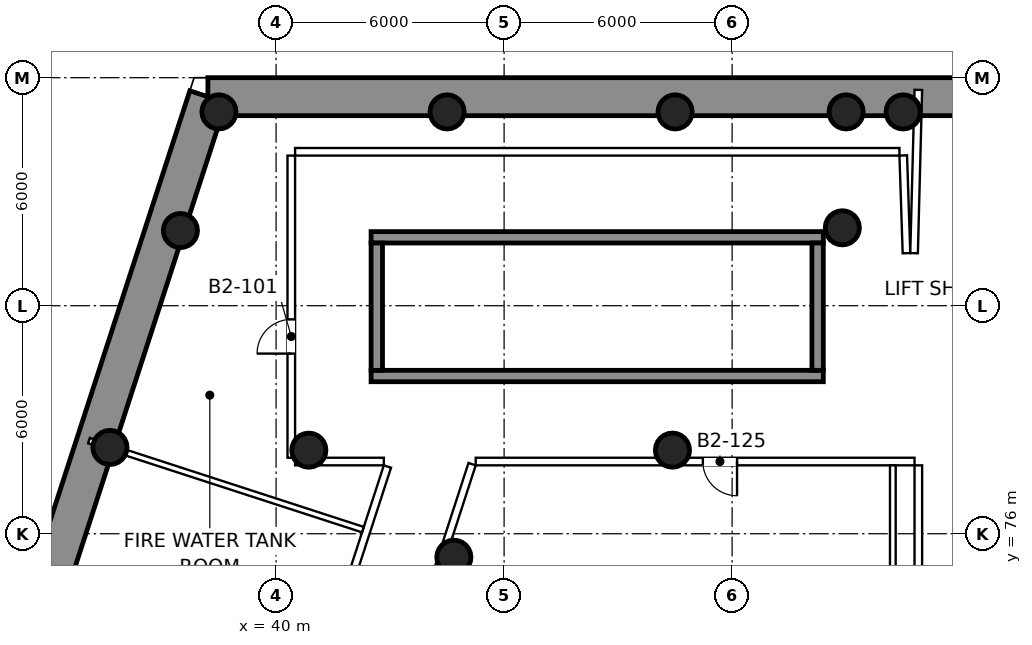
"""IFC4 building model, lengths in metres.
Left out: names, types, materials, properties, quantities, classifications, styles, units other than length and angle.
Written with IfcOpenShell. Run it as: python <this file> out.ifc"""

import sys

from ifc_helpers import new_model, si_unit, direction, frame, frame_2d, origin, origin_2d, place, context, subcontext, project, spatial, rectangle, circle, extrude, element, fill, save


model = new_model("IFC4")
c1 = context("Model", 3, precision=1e-05, world=origin(), true_north=direction((0.0, 1.0)))
c2 = subcontext(c1, "Body", "Model", "MODEL_VIEW")
j1 = project(units=[si_unit("LENGTHUNIT", "METRE"), si_unit("PLANEANGLEUNIT", "RADIAN")], contexts=[c1])
p1 = place(None, origin())
s1 = spatial("IfcSite", under=j1, at=p1, CompositionType="ELEMENT")
p2 = place(p1, origin())
s2 = spatial("IfcBuilding", under=s1, at=p2, CompositionType="ELEMENT")
p3 = place(p2, frame((0.0, 0.0, -10.0)))
s3 = spatial("IfcBuildingStorey", under=s2, at=p3, CompositionType="ELEMENT", Elevation=-10.0)
p4 = place(p3, frame((29.446, 60.539, 0.0), z_axis=(0.0, 0.0, 1.0), x_axis=(0.309015382076, 0.951057040161, 0.0)))
e1 = element("IfcWall", 1, at=p4, inside=s3, PredefinedType="SOLIDWALL", context=c2, shape_type="SweptSolid", body=[
    extrude(rectangle(XDim=28.348, YDim=1.0, at=frame_2d((14.174, 0.0))), origin(), (0.0, 0.0, 1.0), 4.65),
])
p5 = place(p3, frame((38.206, 87.5, 0.0), z_axis=(0.0, 0.0, 1.0), x_axis=(1.0, 0.0, 0.0)))
e2 = element("IfcWall", 2, at=p5, inside=s3, PredefinedType="SOLIDWALL", context=c2, shape_type="SweptSolid", body=[
    extrude(rectangle(XDim=20.794, YDim=1.0, at=frame_2d((10.397, 0.0))), origin(), (0.0, 0.0, 1.0), 4.65),
])
for number, where, z_axis, x_axis in (
    (3, (54.9, 84.05, 0.0), (0.0, 0.0, 1.0), (1.0, 0.0, 0.0)),
    (4, (50.43, 78.2, 0.0), (0.0, 0.0, 1.0), (1.0, 0.0, 0.0)),
    (5, (56.5, 87.1, 0.0), (0.0, 0.0, 1.0), (1.0, 0.0, 0.0)),
    (6, (50.5, 87.1, 0.0), (0.0, 0.0, 1.0), (1.0, 0.0, 0.0)),
    (7, (44.5, 87.1, 0.0), (0.0, 0.0, 1.0), (1.0, 0.0, 0.0)),
    (8, (38.496, 87.1, 0.0), (0.0, 0.0, 1.0), (1.0, 0.0, 0.0)),
    (9, (37.482, 83.978, 0.0), (0.0, 0.0, 1.0), (1.0, 0.0, 0.0)),
    (10, (35.628, 78.271, 0.0), (0.0, 0.0, 1.0), (1.0, 0.0, 0.0)),
    (11, (40.862, 78.199, 0.0), (0.0, 0.0, 1.0), (1.0, 0.0, 0.0)),
    (12, (55.0, 87.1, 0.0), (0.0, 0.0, 1.0), (1.0, 0.0, 0.0)),
    (13, (44.678, 75.382, 0.0), (0.0, 0.0, 1.0), (1.0, 0.0, 0.0)),
):
    element("IfcColumn", number, at=place(p3, frame(where, z_axis=z_axis, x_axis=x_axis)), inside=s3, PredefinedType="COLUMN", context=c2, shape_type="SweptSolid", body=[
        extrude(circle(Radius=0.45, at=origin_2d()), origin(), (0.0, 0.0, 1.0), 5.0),
    ])
for number, where, z_axis, x_axis in (
    (14, (42.5, 80.15, 0.0), (0.0, 0.0, 1.0), (1.0, 0.0, 0.0)),
    (15, (42.5, 83.8, 0.0), (0.0, 0.0, 1.0), (1.0, 0.0, 0.0)),
):
    element("IfcWall", number, at=place(p3, frame(where, z_axis=z_axis, x_axis=x_axis)), inside=s3, PredefinedType="SHEAR", context=c2, shape_type="SweptSolid", body=[
        extrude(rectangle(XDim=11.9, YDim=0.3, at=frame_2d((5.95, 0.0))), origin(), (0.0, 0.0, 1.0), 5.0),
    ])
for number, where, z_axis, x_axis in (
    (16, (42.65, 80.3, 0.0), (0.0, 0.0, 1.0), (0.0, 1.0, 0.0)),
    (17, (54.25, 80.3, 0.0), (0.0, 0.0, 1.0), (0.0, 1.0, 0.0)),
):
    element("IfcWall", number, at=place(p3, frame(where, z_axis=z_axis, x_axis=x_axis)), inside=s3, PredefinedType="SHEAR", context=c2, shape_type="SweptSolid", body=[
        extrude(rectangle(XDim=3.35, YDim=0.3, at=frame_2d((1.675, 0.0))), origin(), (0.0, 0.0, 1.0), 5.0),
    ])
p6 = place(p3, frame((38.495, 64.119, 0.0), z_axis=(0.0, 0.0, 1.0), x_axis=(0.309012990643, 0.951057817177, 0.0)))
e18 = element("IfcWall", 18, at=p6, inside=s3, PredefinedType="PARTITIONING", context=c2, shape_type="SweptSolid", body=[
    extrude(rectangle(XDim=14.352, YDim=0.2, at=frame_2d((7.176, 0.0))), origin(), (0.0, 0.0, 1.0), 4.65),
])
p7 = place(p6, frame((9.441, 0.0, 0.0)))
e19 = element("IfcOpeningElement", 19, at=p7, cuts=e18, PredefinedType="OPENING", context=c2, shape_type="SweptSolid", body=[
    extrude(rectangle(XDim=0.9, YDim=2.1, at=frame_2d((0.45, 1.05))), frame((0.0, 0.11, 0.0), z_axis=(0.0, -1.0, 0.0), x_axis=(1.0, 0.0, 0.0)), (0.0, 0.0, 1.0), 0.22),
])
p8 = place(p6, frame((3.124, 0.0, 0.0)))
e20 = element("IfcOpeningElement", 20, at=p8, cuts=e18, PredefinedType="OPENING", context=c2, shape_type="SweptSolid", body=[
    extrude(rectangle(XDim=0.9, YDim=2.1, at=frame_2d((0.45, 1.05))), frame((0.0, 0.11, 0.0), z_axis=(0.0, -1.0, 0.0), x_axis=(1.0, 0.0, 0.0)), (0.0, 0.0, 1.0), 0.22),
])
p9 = place(p3, frame((42.835, 77.9, 0.0), z_axis=(0.0, 0.0, 1.0), x_axis=(-1.0, 0.0, 0.0)))
e21 = element("IfcWall", 21, at=p9, inside=s3, PredefinedType="PARTITIONING", context=c2, shape_type="SweptSolid", body=[
    extrude(rectangle(XDim=2.335, YDim=0.2, at=frame_2d((1.167, 0.0))), origin(), (0.0, 0.0, 1.0), 4.65),
])
p10 = place(p3, frame((40.4, 78.0, 0.0), z_axis=(0.0, 0.0, 1.0), x_axis=(0.0, 1.0, 0.0)))
e22 = element("IfcWall", 22, at=p10, inside=s3, PredefinedType="PARTITIONING", context=c2, shape_type="SweptSolid", body=[
    extrude(rectangle(XDim=7.95, YDim=0.2, at=frame_2d((3.975, 0.0))), origin(), (0.0, 0.0, 1.0), 4.65),
])
p11 = place(p10, frame((2.74, 0.0, 0.0)))
e23 = element("IfcOpeningElement", 23, at=p11, cuts=e22, PredefinedType="OPENING", context=c2, shape_type="SweptSolid", body=[
    extrude(rectangle(XDim=0.9, YDim=2.1, at=frame_2d((0.45, 1.05))), frame((0.0, 0.11, 0.0), z_axis=(0.0, -1.0, 0.0), x_axis=(1.0, 0.0, 0.0)), (0.0, 0.0, 1.0), 0.22),
])
p12 = place(p3, frame((40.5, 86.05, 0.0), z_axis=(0.0, 0.0, 1.0), x_axis=(1.0, 0.0, 0.0)))
e24 = element("IfcWall", 24, at=p12, inside=s3, PredefinedType="PARTITIONING", context=c2, shape_type="SweptSolid", body=[
    extrude(rectangle(XDim=15.903, YDim=0.2, at=frame_2d((7.952, 0.0))), origin(), (0.0, 0.0, 1.0), 3.75),
])
p13 = place(p3, frame((56.503, 85.953, 0.0), z_axis=(0.0, 0.0, 1.0), x_axis=(0.033027267016, -0.999454451005, 0.0)))
e25 = element("IfcWall", 25, at=p13, inside=s3, PredefinedType="PARTITIONING", context=c2, shape_type="SweptSolid", body=[
    extrude(rectangle(XDim=2.573, YDim=0.2, at=frame_2d((1.286, 0.0))), origin(), (0.0, 0.0, 1.0), 3.95),
])
p14 = place(p3, frame((56.788, 83.383, 0.0), z_axis=(0.0, 0.0, 1.0), x_axis=(0.026025742555, 0.999661272994, 0.0)))
e26 = element("IfcWall", 26, at=p14, inside=s3, PredefinedType="PARTITIONING", context=c2, shape_type="SweptSolid", body=[
    extrude(rectangle(XDim=4.296, YDim=0.2, at=frame_2d((2.148, 0.0))), origin(), (0.0, 0.0, 1.0), 3.75),
])
p15 = place(p3, frame((56.9, 69.0, 0.0), z_axis=(0.0, 0.0, 1.0), x_axis=(0.0, 1.0, 0.0)))
e27 = element("IfcWall", 27, at=p15, inside=s3, PredefinedType="PARTITIONING", context=c2, shape_type="SweptSolid", body=[
    extrude(rectangle(XDim=8.8, YDim=0.2, at=frame_2d((4.4, 0.0))), origin(), (0.0, 0.0, 1.0), 3.85),
])
p16 = place(p3, frame((56.8, 77.9, 0.0), z_axis=(0.0, 0.0, 1.0), x_axis=(-1.0, 0.0, 0.0)))
e28 = element("IfcWall", 28, at=p16, inside=s3, PredefinedType="PARTITIONING", context=c2, shape_type="SweptSolid", body=[
    extrude(rectangle(XDim=11.547, YDim=0.2, at=frame_2d((5.773, 0.0))), origin(), (0.0, 0.0, 1.0), 4.65),
])
p17 = place(p16, frame((4.67, 0.0, 0.0)))
e29 = element("IfcOpeningElement", 29, at=p17, cuts=e28, PredefinedType="OPENING", context=c2, shape_type="SweptSolid", body=[
    extrude(rectangle(XDim=0.9, YDim=2.1, at=frame_2d((0.45, 1.05))), frame((0.0, 0.11, 0.0), z_axis=(0.0, -1.0, 0.0), x_axis=(1.0, 0.0, 0.0)), (0.0, 0.0, 1.0), 0.22),
])
p18 = place(p3, frame((45.158, 77.831, 0.0), z_axis=(0.0, 0.0, 1.0), x_axis=(-0.309018378218, -0.951056066656, 0.0)))
e30 = element("IfcWall", 30, at=p18, inside=s3, PredefinedType="PARTITIONING", context=c2, shape_type="SweptSolid", body=[
    extrude(rectangle(XDim=14.353, YDim=0.2, at=frame_2d((7.176, 0.0))), origin(), (0.0, 0.0, 1.0), 3.95),
])
p19 = place(p3, frame((35.076, 78.45, 0.0), z_axis=(0.0, 0.0, 1.0), x_axis=(0.951058681979, -0.309010329007, 0.0)))
e31 = element("IfcWall", 31, at=p19, inside=s3, PredefinedType="PARTITIONING", context=c2, shape_type="SweptSolid", body=[
    extrude(rectangle(XDim=7.58, YDim=0.15, at=frame_2d((3.79, 0.0))), origin(), (0.0, 0.0, 1.0), 3.95),
])
p20 = place(p3, frame((56.229, 64.091, 0.0), z_axis=(0.0, 0.0, 1.0), x_axis=(0.0, 1.0, 0.0)))
e32 = element("IfcWall", 32, at=p20, inside=s3, PredefinedType="PARTITIONING", context=c2, shape_type="SweptSolid", body=[
    extrude(rectangle(XDim=13.709, YDim=0.15, at=frame_2d((6.854, 0.0))), origin(), (0.0, 0.0, 1.0), 3.85),
])
p21 = place(p11, origin())
e33 = element("IfcDoor", 33, at=p21, inside=s3, OperationType="SINGLE_SWING_LEFT", PredefinedType="DOOR", context=c2, shape_type="SweptSolid", body=[
    extrude(rectangle(XDim=0.9, YDim=2.1, at=frame_2d((0.45, 1.05))), frame((0.0, 0.025, 0.0), z_axis=(0.0, -1.0, 0.0), x_axis=(1.0, 0.0, 0.0)), (0.0, 0.0, 1.0), 0.05),
])
fill(e23, e33)
p22 = place(p17, origin())
e34 = element("IfcDoor", 34, at=p22, inside=s3, OperationType="SINGLE_SWING_LEFT", PredefinedType="DOOR", context=c2, shape_type="SweptSolid", body=[
    extrude(rectangle(XDim=0.9, YDim=2.1, at=frame_2d((0.45, 1.05))), frame((0.0, 0.025, 0.0), z_axis=(0.0, -1.0, 0.0), x_axis=(1.0, 0.0, 0.0)), (0.0, 0.0, 1.0), 0.05),
])
fill(e29, e34)
save(model, sys.argv[1])
